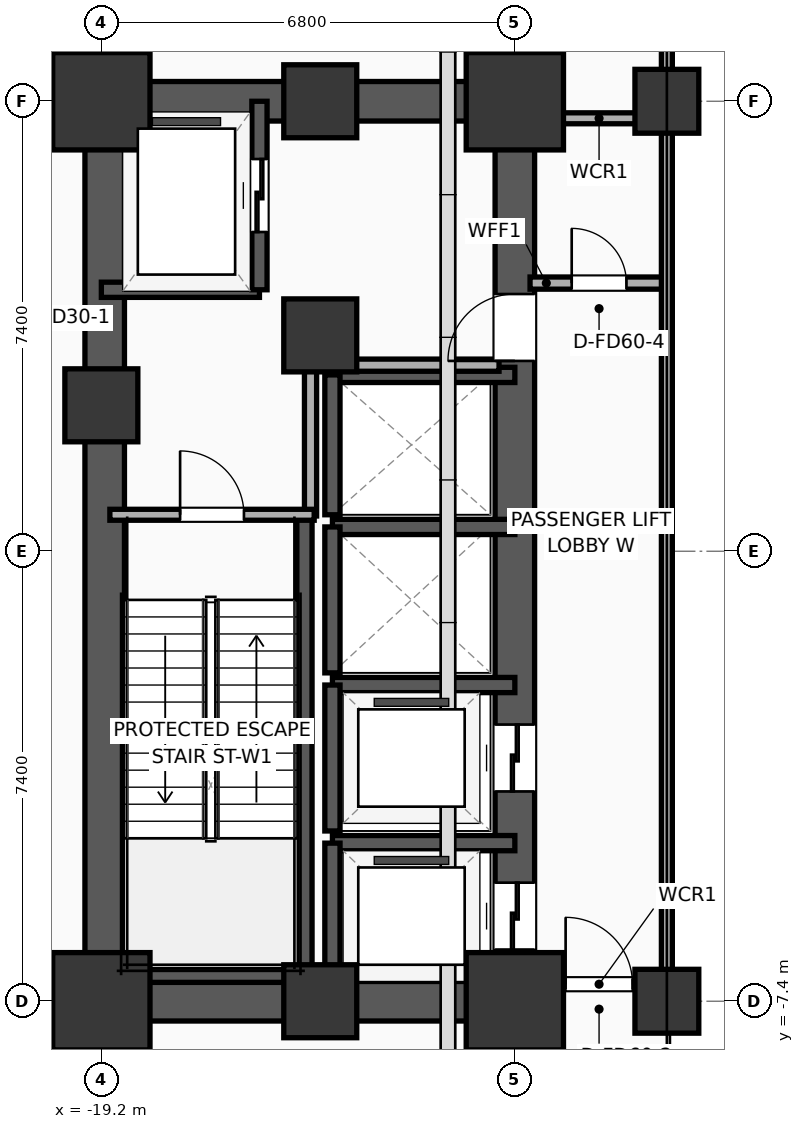
"""IFC4 building model, lengths in metres.
Left out: names, types, materials, properties, quantities, classifications, styles, units other than length and angle.
Written with IfcOpenShell. Run it as: python <this file> out.ifc"""

import sys

from ifc_helpers import new_model, si_unit, direction, frame, frame_2d, origin, origin_2d, place, context, subcontext, project, spatial, rectangle, extrude, element, fill, save


model = new_model("IFC4")
c1 = context("Model", 3, precision=1e-05, world=origin(), true_north=direction((0.0, 1.0)))
c2 = subcontext(c1, "Body", "Model", "MODEL_VIEW")
j1 = project(units=[si_unit("LENGTHUNIT", "METRE"), si_unit("PLANEANGLEUNIT", "RADIAN")], contexts=[c1])
p1 = place(None, origin())
s1 = spatial("IfcSite", under=j1, at=p1, CompositionType="ELEMENT")
p2 = place(p1, origin())
s2 = spatial("IfcBuilding", under=s1, at=p2, CompositionType="ELEMENT")
p3 = place(p2, frame((0.0, 0.0, 5.2)))
s3 = spatial("IfcBuildingStorey", under=s2, at=p3, CompositionType="ELEMENT", Elevation=5.2)
p4 = place(p3, frame((-19.2, -7.4, 0.0), z_axis=(0.0, 0.0, 1.0), x_axis=(1.0, 0.0, 0.0)))
e1 = element("IfcColumn", 1, at=p4, inside=s3, PredefinedType="COLUMN", context=c2, shape_type="SweptSolid", body=[
    extrude(rectangle(XDim=1.6, YDim=1.6, at=origin_2d()), origin(), (0.0, 0.0, 1.0), 5.2),
])
p5 = place(p3, frame((-19.2, 2.4, 0.0), z_axis=(0.0, 0.0, 1.0), x_axis=(1.0, 0.0, 0.0)))
e2 = element("IfcColumn", 2, at=p5, inside=s3, PredefinedType="COLUMN", context=c2, shape_type="SweptSolid", body=[
    extrude(rectangle(XDim=1.2, YDim=1.2, at=origin_2d()), origin(), (0.0, 0.0, 1.0), 5.2),
])
p6 = place(p3, frame((-19.2, 7.4, 0.0), z_axis=(0.0, 0.0, 1.0), x_axis=(1.0, 0.0, 0.0)))
e3 = element("IfcColumn", 3, at=p6, inside=s3, PredefinedType="COLUMN", context=c2, shape_type="SweptSolid", body=[
    extrude(rectangle(XDim=1.6, YDim=1.6, at=origin_2d()), origin(), (0.0, 0.0, 1.0), 5.2),
])
for number, where, z_axis, x_axis in (
    (4, (-15.6, -7.4, 0.0), (0.0, 0.0, 1.0), (1.0, 0.0, 0.0)),
    (5, (-15.6, 7.4, 0.0), (0.0, 0.0, 1.0), (1.0, 0.0, 0.0)),
):
    element("IfcColumn", number, at=place(p3, frame(where, z_axis=z_axis, x_axis=x_axis)), inside=s3, PredefinedType="COLUMN", context=c2, shape_type="SweptSolid", body=[
        extrude(rectangle(XDim=1.2, YDim=1.2, at=origin_2d()), origin(), (0.0, 0.0, 1.0), 5.2),
    ])
p7 = place(p3, frame((-12.4, -7.4, 0.0), z_axis=(0.0, 0.0, 1.0), x_axis=(1.0, 0.0, 0.0)))
e6 = element("IfcColumn", 6, at=p7, inside=s3, PredefinedType="COLUMN", context=c2, shape_type="SweptSolid", body=[
    extrude(rectangle(XDim=1.6, YDim=1.6, at=origin_2d()), origin(), (0.0, 0.0, 1.0), 5.2),
])
p8 = place(p3, frame((-15.6, 3.55, 0.0), z_axis=(0.0, 0.0, 1.0), x_axis=(1.0, 0.0, 0.0)))
e7 = element("IfcColumn", 7, at=p8, inside=s3, PredefinedType="COLUMN", context=c2, shape_type="SweptSolid", body=[
    extrude(rectangle(XDim=1.2, YDim=1.2, at=origin_2d()), origin(), (0.0, 0.0, 1.0), 5.2),
])
p9 = place(p3, frame((-12.4, 7.4, 0.0), z_axis=(0.0, 0.0, 1.0), x_axis=(1.0, 0.0, 0.0)))
e8 = element("IfcColumn", 8, at=p9, inside=s3, PredefinedType="COLUMN", context=c2, shape_type="SweptSolid", body=[
    extrude(rectangle(XDim=1.6, YDim=1.6, at=origin_2d()), origin(), (0.0, 0.0, 1.0), 5.2),
])
for number, where, z_axis, x_axis in (
    (9, (-19.525, -7.4, 0.0), (0.0, 0.0, 1.0), (1.0, 0.0, 0.0)),
    (10, (-19.525, 7.4, 0.0), (0.0, 0.0, 1.0), (1.0, 0.0, 0.0)),
):
    element("IfcWall", number, at=place(p3, frame(where, z_axis=z_axis, x_axis=x_axis)), inside=s3, PredefinedType="SHEAR", context=c2, shape_type="SweptSolid", body=[
        extrude(rectangle(XDim=7.45, YDim=0.65, at=frame_2d((3.725, 0.0))), origin(), (0.0, 0.0, 1.0), 4.92),
    ])
p10 = place(p3, frame((-19.145, -7.4, 0.0), z_axis=(0.0, 0.0, 1.0), x_axis=(0.0, 1.0, 0.0)))
e11 = element("IfcWall", 11, at=p10, inside=s3, PredefinedType="SHEAR", context=c2, shape_type="SweptSolid", body=[
    extrude(rectangle(XDim=14.8, YDim=0.65, at=frame_2d((7.4, 0.0))), origin(), (0.0, 0.0, 1.0), 4.92),
])
p11 = place(p3, frame((-12.4, -7.4, 0.0), z_axis=(0.0, 0.0, 1.0), x_axis=(0.0, 1.0, 0.0)))
e12 = element("IfcWall", 12, at=p11, inside=s3, PredefinedType="SHEAR", context=c2, shape_type="SweptSolid", body=[
    extrude(rectangle(XDim=14.8, YDim=0.65, at=frame_2d((7.4, 0.0))), origin(), (0.0, 0.0, 1.0), 4.92),
])
p12 = place(p11, frame((0.85, 0.0, 0.0)))
e13 = element("IfcOpeningElement", 13, at=p12, cuts=e12, PredefinedType="OPENING", context=c2, shape_type="SweptSolid", body=[
    extrude(rectangle(XDim=1.1, YDim=2.05, at=frame_2d((0.55, 1.025))), frame((0.0, 0.335, 0.0), z_axis=(0.0, -1.0, 0.0), x_axis=(1.0, 0.0, 0.0)), (0.0, 0.0, 1.0), 0.67),
])
p13 = place(p11, frame((3.45, 0.0, 0.0)))
e14 = element("IfcOpeningElement", 14, at=p13, cuts=e12, PredefinedType="OPENING", context=c2, shape_type="SweptSolid", body=[
    extrude(rectangle(XDim=1.1, YDim=2.05, at=frame_2d((0.55, 1.025))), frame((0.0, 0.335, 0.0), z_axis=(0.0, -1.0, 0.0), x_axis=(1.0, 0.0, 0.0)), (0.0, 0.0, 1.0), 0.67),
])
p14 = place(p11, frame((10.53, 0.0, 0.0)))
e15 = element("IfcOpeningElement", 15, at=p14, cuts=e12, PredefinedType="OPENING", context=c2, shape_type="SweptSolid", body=[
    extrude(rectangle(XDim=1.1, YDim=2.05, at=frame_2d((0.55, 1.025))), frame((0.0, 0.335, 0.0), z_axis=(0.0, -1.0, 0.0), x_axis=(1.0, 0.0, 0.0)), (0.0, 0.0, 1.0), 0.67),
])
p15 = place(p3, frame((-15.86, -7.085, 0.0), z_axis=(0.0, 0.0, 1.0), x_axis=(0.0, 1.0, 0.0)))
e16 = element("IfcWall", 16, at=p15, inside=s3, PredefinedType="SOLIDWALL", context=c2, shape_type="SweptSolid", body=[
    extrude(rectangle(XDim=7.685, YDim=0.25, at=frame_2d((3.843, 0.0))), origin(), (0.0, 0.0, 1.0), 4.92),
])
p16 = place(p3, frame((-19.2, -6.965, 0.0), z_axis=(0.0, 0.0, 1.0), x_axis=(1.0, 0.0, 0.0)))
e17 = element("IfcWall", 17, at=p16, inside=s3, PredefinedType="SOLIDWALL", context=c2, shape_type="SweptSolid", body=[
    extrude(rectangle(XDim=3.46, YDim=0.25, at=frame_2d((1.73, 0.0))), origin(), (0.0, 0.0, 1.0), 4.92),
])
for number, where, z_axis, x_axis in (
    (18, (-9.9, -7.4, 0.0), (0.0, 0.0, 1.0), (1.0, 0.0, 0.0)),
    (19, (-9.9, 7.4, 0.0), (0.0, 0.0, 1.0), (1.0, 0.0, 0.0)),
):
    element("IfcColumn", number, at=place(p3, frame(where, z_axis=z_axis, x_axis=x_axis)), inside=s3, PredefinedType="COLUMN", context=c2, shape_type="SweptSolid", body=[
        extrude(rectangle(XDim=1.05, YDim=1.05, at=origin_2d()), origin(), (0.0, 0.0, 1.0), 5.2),
    ])
p17 = place(p3, frame((-19.2, 4.3, 0.0), z_axis=(0.0, 0.0, 1.0), x_axis=(1.0, 0.0, 0.0)))
e20 = element("IfcWall", 20, at=p17, inside=s3, PredefinedType="SOLIDWALL", context=c2, shape_type="SweptSolid", body=[
    extrude(rectangle(XDim=2.6, YDim=0.25, at=frame_2d((1.3, 0.0))), origin(), (0.0, 0.0, 1.0), 4.92),
])
p18 = place(p3, frame((-16.6, 4.3, 0.0), z_axis=(0.0, 0.0, 1.0), x_axis=(0.0, 1.0, 0.0)))
e21 = element("IfcWall", 21, at=p18, inside=s3, PredefinedType="SOLIDWALL", context=c2, shape_type="SweptSolid", body=[
    extrude(rectangle(XDim=3.1, YDim=0.25, at=frame_2d((1.55, 0.0))), origin(), (0.0, 0.0, 1.0), 4.92),
])
p19 = place(p18, frame((0.95, 0.0, 0.0)))
e22 = element("IfcOpeningElement", 22, at=p19, cuts=e21, PredefinedType="OPENING", context=c2, shape_type="SweptSolid", body=[
    extrude(rectangle(XDim=1.2, YDim=2.05, at=frame_2d((0.6, 1.025))), frame((0.0, 0.135, 0.0), z_axis=(0.0, -1.0, 0.0), x_axis=(1.0, 0.0, 0.0)), (0.0, 0.0, 1.0), 0.27),
])
p20 = place(p3, frame((-12.4, -4.8, 0.0), z_axis=(0.0, 0.0, 1.0), x_axis=(-1.0, 0.0, 0.0)))
e23 = element("IfcWall", 23, at=p20, inside=s3, PredefinedType="SOLIDWALL", context=c2, shape_type="SweptSolid", body=[
    extrude(rectangle(XDim=3.0, YDim=0.25, at=frame_2d((1.5, 0.0))), origin(), (0.0, 0.0, 1.0), 4.92),
])
p21 = place(p3, frame((-15.4, -4.8, 0.0), z_axis=(0.0, 0.0, 1.0), x_axis=(0.0, -1.0, 0.0)))
e24 = element("IfcWall", 24, at=p21, inside=s3, PredefinedType="SOLIDWALL", context=c2, shape_type="SweptSolid", body=[
    extrude(rectangle(XDim=2.6, YDim=0.25, at=frame_2d((1.3, 0.0))), origin(), (0.0, 0.0, 1.0), 4.92),
])
p22 = place(p3, frame((-12.4, -2.2, 0.0), z_axis=(0.0, 0.0, 1.0), x_axis=(-1.0, 0.0, 0.0)))
e25 = element("IfcWall", 25, at=p22, inside=s3, PredefinedType="SOLIDWALL", context=c2, shape_type="SweptSolid", body=[
    extrude(rectangle(XDim=3.0, YDim=0.25, at=frame_2d((1.5, 0.0))), origin(), (0.0, 0.0, 1.0), 4.92),
])
p23 = place(p3, frame((-15.4, -2.2, 0.0), z_axis=(0.0, 0.0, 1.0), x_axis=(0.0, -1.0, 0.0)))
e26 = element("IfcWall", 26, at=p23, inside=s3, PredefinedType="SOLIDWALL", context=c2, shape_type="SweptSolid", body=[
    extrude(rectangle(XDim=2.4, YDim=0.25, at=frame_2d((1.2, 0.0))), origin(), (0.0, 0.0, 1.0), 4.92),
])
p24 = place(p3, frame((-12.4, 0.4, 0.0), z_axis=(0.0, 0.0, 1.0), x_axis=(-1.0, 0.0, 0.0)))
e27 = element("IfcWall", 27, at=p24, inside=s3, PredefinedType="SOLIDWALL", context=c2, shape_type="SweptSolid", body=[
    extrude(rectangle(XDim=3.0, YDim=0.25, at=frame_2d((1.5, 0.0))), origin(), (0.0, 0.0, 1.0), 4.92),
])
p25 = place(p3, frame((-15.4, 0.4, 0.0), z_axis=(0.0, 0.0, 1.0), x_axis=(0.0, -1.0, 0.0)))
e28 = element("IfcWall", 28, at=p25, inside=s3, PredefinedType="SOLIDWALL", context=c2, shape_type="SweptSolid", body=[
    extrude(rectangle(XDim=2.4, YDim=0.25, at=frame_2d((1.2, 0.0))), origin(), (0.0, 0.0, 1.0), 4.92),
])
p26 = place(p3, frame((-12.4, 2.9, 0.0), z_axis=(0.0, 0.0, 1.0), x_axis=(-1.0, 0.0, 0.0)))
e29 = element("IfcWall", 29, at=p26, inside=s3, PredefinedType="SOLIDWALL", context=c2, shape_type="SweptSolid", body=[
    extrude(rectangle(XDim=3.0, YDim=0.25, at=frame_2d((1.5, 0.0))), origin(), (0.0, 0.0, 1.0), 4.92),
])
p27 = place(p3, frame((-15.4, 2.9, 0.0), z_axis=(0.0, 0.0, 1.0), x_axis=(0.0, -1.0, 0.0)))
e30 = element("IfcWall", 30, at=p27, inside=s3, PredefinedType="SOLIDWALL", context=c2, shape_type="SweptSolid", body=[
    extrude(rectangle(XDim=2.3, YDim=0.25, at=frame_2d((1.15, 0.0))), origin(), (0.0, 0.0, 1.0), 4.92),
])
p28 = place(p3, frame((-15.76, 0.58, 0.0), z_axis=(0.0, 0.0, 1.0), x_axis=(0.0, 1.0, 0.0)))
e31 = element("IfcWall", 31, at=p28, inside=s3, PredefinedType="PARTITIONING", context=c2, shape_type="SweptSolid", body=[
    extrude(rectangle(XDim=2.52, YDim=0.2, at=frame_2d((1.26, 0.0))), origin(), (0.0, 0.0, 1.0), 4.92),
])
p29 = place(p3, frame((-15.82, 3.06, 0.0), z_axis=(0.0, 0.0, 1.0), x_axis=(1.0, 0.0, 0.0)))
e32 = element("IfcWall", 32, at=p29, inside=s3, PredefinedType="PARTITIONING", context=c2, shape_type="SweptSolid", body=[
    extrude(rectangle(XDim=3.16, YDim=0.2, at=frame_2d((1.58, 0.0))), origin(), (0.0, 0.0, 1.0), 4.92),
])
p30 = place(p3, frame((-19.06, 0.6, 0.0), z_axis=(0.0, 0.0, 1.0), x_axis=(1.0, 0.0, 0.0)))
e33 = element("IfcWall", 33, at=p30, inside=s3, PredefinedType="PARTITIONING", context=c2, shape_type="SweptSolid", body=[
    extrude(rectangle(XDim=3.36, YDim=0.18, at=frame_2d((1.68, 0.0))), origin(), (0.0, 0.0, 1.0), 4.92),
])
p31 = place(p30, frame((1.155, 0.0, 0.0)))
e34 = element("IfcOpeningElement", 34, at=p31, cuts=e33, PredefinedType="OPENING", context=c2, shape_type="SweptSolid", body=[
    extrude(rectangle(XDim=1.05, YDim=2.05, at=frame_2d((0.525, 1.025))), frame((0.0, 0.1, 0.0), z_axis=(0.0, -1.0, 0.0), x_axis=(1.0, 0.0, 0.0)), (0.0, 0.0, 1.0), 0.2),
])
p32 = place(p3, frame((-12.15, 4.41, 0.0), z_axis=(0.0, 0.0, 1.0), x_axis=(1.0, 0.0, 0.0)))
e35 = element("IfcWall", 35, at=p32, inside=s3, PredefinedType="PARTITIONING", context=c2, shape_type="SweptSolid", body=[
    extrude(rectangle(XDim=2.27, YDim=0.2, at=frame_2d((1.135, 0.0))), origin(), (0.0, 0.0, 1.0), 4.92),
])
p33 = place(p32, frame((0.685, 0.0, 0.0)))
e36 = element("IfcOpeningElement", 36, at=p33, cuts=e35, PredefinedType="OPENING", context=c2, shape_type="SweptSolid", body=[
    extrude(rectangle(XDim=0.9, YDim=2.05, at=frame_2d((0.45, 1.025))), frame((0.0, 0.11, 0.0), z_axis=(0.0, -1.0, 0.0), x_axis=(1.0, 0.0, 0.0)), (0.0, 0.0, 1.0), 0.22),
])
p34 = place(p3, frame((-12.15, 7.12, 0.0), z_axis=(0.0, 0.0, 1.0), x_axis=(1.0, 0.0, 0.0)))
e37 = element("IfcWall", 37, at=p34, inside=s3, PredefinedType="PARTITIONING", context=c2, shape_type="SweptSolid", body=[
    extrude(rectangle(XDim=2.27, YDim=0.18, at=frame_2d((1.135, 0.0))), origin(), (0.0, 0.0, 1.0), 4.21),
])
p35 = place(p3, frame((-12.15, -7.12, 0.0), z_axis=(0.0, 0.0, 1.0), x_axis=(1.0, 0.0, 0.0)))
e38 = element("IfcWall", 38, at=p35, inside=s3, PredefinedType="PARTITIONING", context=c2, shape_type="SweptSolid", body=[
    extrude(rectangle(XDim=2.27, YDim=0.18, at=frame_2d((1.135, 0.0))), origin(), (0.0, 0.0, 1.0), 4.21),
])
p36 = place(p35, frame((0.585, 0.0, 0.0)))
e39 = element("IfcOpeningElement", 39, at=p36, cuts=e38, PredefinedType="OPENING", context=c2, shape_type="SweptSolid", body=[
    extrude(rectangle(XDim=1.1, YDim=2.05, at=frame_2d((0.55, 1.025))), frame((0.0, 0.1, 0.0), z_axis=(0.0, -1.0, 0.0), x_axis=(1.0, 0.0, 0.0)), (0.0, 0.0, 1.0), 0.2),
])
p37 = place(p3, frame((-9.9, -7.12, 0.0), z_axis=(0.0, 0.0, 1.0), x_axis=(0.0, 1.0, 0.0)))
e40 = element("IfcWall", 40, at=p37, inside=s3, PredefinedType="PARTITIONING", context=c2, shape_type="SweptSolid", body=[
    extrude(rectangle(XDim=16.82, YDim=0.18, at=frame_2d((8.41, 0.0))), origin(), (0.0, 0.0, 1.0), 4.21),
])
p38 = place(p19, origin())
e41 = element("IfcDoor", 41, at=p38, inside=s3, OperationType="SLIDING_TO_LEFT", PredefinedType="DOOR", context=c2, shape_type="SweptSolid", body=[
    extrude(rectangle(XDim=1.2, YDim=2.05, at=frame_2d((0.6, 1.025))), frame((0.0, 0.025, 0.0), z_axis=(0.0, -1.0, 0.0), x_axis=(1.0, 0.0, 0.0)), (0.0, 0.0, 1.0), 0.05),
])
fill(e22, e41)
p39 = place(p12, origin())
e42 = element("IfcDoor", 42, at=p39, inside=s3, OperationType="SLIDING_TO_LEFT", PredefinedType="DOOR", context=c2, shape_type="SweptSolid", body=[
    extrude(rectangle(XDim=1.1, YDim=2.05, at=frame_2d((0.55, 1.025))), frame((0.0, 0.025, 0.0), z_axis=(0.0, -1.0, 0.0), x_axis=(1.0, 0.0, 0.0)), (0.0, 0.0, 1.0), 0.05),
])
fill(e13, e42)
p40 = place(p13, origin())
e43 = element("IfcDoor", 43, at=p40, inside=s3, OperationType="SLIDING_TO_LEFT", PredefinedType="DOOR", context=c2, shape_type="SweptSolid", body=[
    extrude(rectangle(XDim=1.1, YDim=2.05, at=frame_2d((0.55, 1.025))), frame((0.0, 0.025, 0.0), z_axis=(0.0, -1.0, 0.0), x_axis=(1.0, 0.0, 0.0)), (0.0, 0.0, 1.0), 0.05),
])
fill(e14, e43)
p41 = place(p31, origin())
e44 = element("IfcDoor", 44, at=p41, inside=s3, OperationType="SINGLE_SWING_LEFT", PredefinedType="DOOR", context=c2, shape_type="SweptSolid", body=[
    extrude(rectangle(XDim=1.05, YDim=2.05, at=frame_2d((0.525, 1.025))), frame((0.0, 0.025, 0.0), z_axis=(0.0, -1.0, 0.0), x_axis=(1.0, 0.0, 0.0)), (0.0, 0.0, 1.0), 0.05),
])
fill(e34, e44)
p42 = place(p33, origin())
e45 = element("IfcDoor", 45, at=p42, inside=s3, OperationType="SINGLE_SWING_LEFT", PredefinedType="DOOR", context=c2, shape_type="SweptSolid", body=[
    extrude(rectangle(XDim=0.9, YDim=2.05, at=frame_2d((0.45, 1.025))), frame((0.0, 0.025, 0.0), z_axis=(0.0, -1.0, 0.0), x_axis=(1.0, 0.0, 0.0)), (0.0, 0.0, 1.0), 0.05),
])
fill(e36, e45)
p43 = place(p36, origin())
e46 = element("IfcDoor", 46, at=p43, inside=s3, OperationType="SINGLE_SWING_LEFT", PredefinedType="DOOR", context=c2, shape_type="SweptSolid", body=[
    extrude(rectangle(XDim=1.1, YDim=2.05, at=frame_2d((0.55, 1.025))), frame((0.0, 0.025, 0.0), z_axis=(0.0, -1.0, 0.0), x_axis=(1.0, 0.0, 0.0)), (0.0, 0.0, 1.0), 0.05),
])
fill(e39, e46)
p44 = place(p14, origin())
e47 = element("IfcDoor", 47, at=p44, inside=s3, OperationType="SINGLE_SWING_LEFT", PredefinedType="DOOR", context=c2, shape_type="SweptSolid", body=[
    extrude(rectangle(XDim=1.1, YDim=2.05, at=frame_2d((0.55, 1.025))), frame((0.0, 0.025, 0.0), z_axis=(0.0, -1.0, 0.0), x_axis=(1.0, 0.0, 0.0)), (0.0, 0.0, 1.0), 0.05),
])
fill(e15, e47)
save(model, sys.argv[1])
